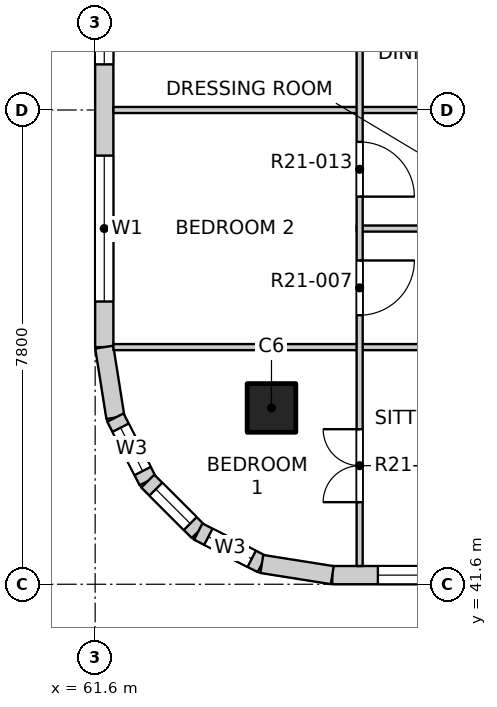
"""IFC4 building model, lengths in metres.
Left out: names, types, materials, properties, quantities, classifications, styles, units other than length and angle.
Written with IfcOpenShell. Run it as: python <this file> out.ifc"""

import sys

from ifc_helpers import new_model, si_unit, direction, frame, frame_2d, origin, origin_2d, place, context, subcontext, project, spatial, rectangle, extrude, element, fill, save


model = new_model("IFC4")
c1 = context("Model", 3, precision=1e-05, world=origin(), true_north=direction((0.0, 1.0)))
c2 = subcontext(c1, "Body", "Model", "MODEL_VIEW")
j1 = project(units=[si_unit("LENGTHUNIT", "METRE"), si_unit("PLANEANGLEUNIT", "RADIAN")], contexts=[c1])
p1 = place(None, origin())
s1 = spatial("IfcSite", under=j1, at=p1, CompositionType="ELEMENT")
p2 = place(p1, origin())
s2 = spatial("IfcBuilding", under=s1, at=p2, CompositionType="ELEMENT")
p3 = place(p2, frame((0.0, 0.0, 214.3)))
s3 = spatial("IfcBuildingStorey", under=s2, at=p3, CompositionType="ELEMENT", Elevation=214.3)
p4 = place(p3, frame((64.5, 44.5, -0.25), z_axis=(0.0, 0.0, 1.0), x_axis=(1.0, 0.0, 0.0)))
e1 = element("IfcColumn", 1, at=p4, inside=s3, PredefinedType="COLUMN", context=c2, shape_type="SweptSolid", body=[
    extrude(rectangle(XDim=0.8, YDim=0.8, at=origin_2d()), origin(), (0.0, 0.0, 1.0), 3.4),
])
p5 = place(p3, frame((65.5, 41.75, 0.0), z_axis=(0.0, 0.0, 1.0), x_axis=(1.0, 0.0, 0.0)))
e2 = element("IfcWall", 2, at=p5, inside=s3, PredefinedType="SOLIDWALL", context=c2, shape_type="SweptSolid", body=[
    extrude(rectangle(XDim=7.4, YDim=0.3, at=frame_2d((3.7, 0.0))), origin(), (0.0, 0.0, 1.0), 2.7),
])
p6 = place(p5, frame((0.75, 0.0, 0.9)))
e3 = element("IfcOpeningElement", 3, at=p6, cuts=e2, PredefinedType="OPENING", context=c2, shape_type="SweptSolid", body=[
    extrude(rectangle(XDim=2.4, YDim=1.8, at=frame_2d((1.2, 0.9))), frame((0.0, 0.16, 0.0), z_axis=(0.0, -1.0, 0.0), x_axis=(1.0, 0.0, 0.0)), (0.0, 0.0, 1.0), 0.32),
])
p7 = place(p5, frame((4.65, 0.0, 0.9)))
e4 = element("IfcOpeningElement", 4, at=p7, cuts=e2, PredefinedType="OPENING", context=c2, shape_type="SweptSolid", body=[
    extrude(rectangle(XDim=2.4, YDim=1.8, at=frame_2d((1.2, 0.9))), frame((0.0, 0.16, 0.0), z_axis=(0.0, -1.0, 0.0), x_axis=(1.0, 0.0, 0.0)), (0.0, 0.0, 1.0), 0.32),
])
p8 = place(p3, frame((61.75, 45.5, 0.0), z_axis=(0.0, 0.0, 1.0), x_axis=(0.0, 1.0, 0.0)))
e5 = element("IfcWall", 5, at=p8, inside=s3, PredefinedType="SOLIDWALL", context=c2, shape_type="SweptSolid", body=[
    extrude(rectangle(XDim=7.4, YDim=0.3, at=frame_2d((3.7, 0.0))), origin(), (0.0, 0.0, 1.0), 2.7),
])
p9 = place(p8, frame((0.75, 0.0, 0.9)))
e6 = element("IfcOpeningElement", 6, at=p9, cuts=e5, PredefinedType="OPENING", context=c2, shape_type="SweptSolid", body=[
    extrude(rectangle(XDim=2.4, YDim=1.8, at=frame_2d((1.2, 0.9))), frame((0.0, 0.16, 0.0), z_axis=(0.0, -1.0, 0.0), x_axis=(1.0, 0.0, 0.0)), (0.0, 0.0, 1.0), 0.32),
])
p10 = place(p8, frame((4.65, 0.0, 0.9)))
e7 = element("IfcOpeningElement", 7, at=p10, cuts=e5, PredefinedType="OPENING", context=c2, shape_type="SweptSolid", body=[
    extrude(rectangle(XDim=2.4, YDim=1.8, at=frame_2d((1.2, 0.9))), frame((0.0, 0.16, 0.0), z_axis=(0.0, -1.0, 0.0), x_axis=(1.0, 0.0, 0.0)), (0.0, 0.0, 1.0), 0.32),
])
p11 = place(p3, frame((61.75, 45.5, 0.0), z_axis=(0.0, 0.0, 1.0), x_axis=(0.156496880861, -0.987678452879, 0.0)))
e8 = element("IfcWall", 8, at=p11, inside=s3, PredefinedType="SOLIDWALL", context=c2, shape_type="SweptSolid", body=[
    extrude(rectangle(XDim=1.173, YDim=0.3, at=frame_2d((0.586, 0.0))), origin(), (0.0, 0.0, 1.0), 2.7),
])
p12 = place(p3, frame((61.934, 44.341, 0.0), z_axis=(0.0, 0.0, 1.0), x_axis=(0.454025524128, -0.890988677504, 0.0)))
e9 = element("IfcWall", 9, at=p12, inside=s3, PredefinedType="SOLIDWALL", context=c2, shape_type="SweptSolid", body=[
    extrude(rectangle(XDim=1.173, YDim=0.3, at=frame_2d((0.587, 0.0))), origin(), (0.0, 0.0, 1.0), 2.7),
])
p13 = place(p12, frame((0.187, 0.0, 0.9)))
e10 = element("IfcOpeningElement", 10, at=p13, cuts=e9, PredefinedType="OPENING", context=c2, shape_type="SweptSolid", body=[
    extrude(rectangle(XDim=0.8, YDim=1.2, at=frame_2d((0.4, 0.6))), frame((0.0, 0.16, 0.0), z_axis=(0.0, -1.0, 0.0), x_axis=(1.0, 0.0, 0.0)), (0.0, 0.0, 1.0), 0.32),
])
p14 = place(p3, frame((62.466, 43.296, 0.0), z_axis=(0.0, 0.0, 1.0), x_axis=(0.707106781187, -0.707106781187, 0.0)))
e11 = element("IfcWall", 11, at=p14, inside=s3, PredefinedType="SOLIDWALL", context=c2, shape_type="SweptSolid", body=[
    extrude(rectangle(XDim=1.173, YDim=0.3, at=frame_2d((0.586, 0.0))), origin(), (0.0, 0.0, 1.0), 2.7),
])
p15 = place(p14, frame((0.187, 0.0, 0.9)))
e12 = element("IfcOpeningElement", 12, at=p15, cuts=e11, PredefinedType="OPENING", context=c2, shape_type="SweptSolid", body=[
    extrude(rectangle(XDim=0.8, YDim=1.2, at=frame_2d((0.4, 0.6))), frame((0.0, 0.16, 0.0), z_axis=(0.0, -1.0, 0.0), x_axis=(1.0, 0.0, 0.0)), (0.0, 0.0, 1.0), 0.32),
])
p16 = place(p3, frame((63.296, 42.466, 0.0), z_axis=(0.0, 0.0, 1.0), x_axis=(0.890988677504, -0.454025524128, 0.0)))
e13 = element("IfcWall", 13, at=p16, inside=s3, PredefinedType="SOLIDWALL", context=c2, shape_type="SweptSolid", body=[
    extrude(rectangle(XDim=1.173, YDim=0.3, at=frame_2d((0.587, 0.0))), origin(), (0.0, 0.0, 1.0), 2.7),
])
p17 = place(p16, frame((0.187, 0.0, 0.9)))
e14 = element("IfcOpeningElement", 14, at=p17, cuts=e13, PredefinedType="OPENING", context=c2, shape_type="SweptSolid", body=[
    extrude(rectangle(XDim=0.8, YDim=1.2, at=frame_2d((0.4, 0.6))), frame((0.0, 0.16, 0.0), z_axis=(0.0, -1.0, 0.0), x_axis=(1.0, 0.0, 0.0)), (0.0, 0.0, 1.0), 0.32),
])
p18 = place(p3, frame((64.341, 41.934, 0.0), z_axis=(0.0, 0.0, 1.0), x_axis=(0.987678452879, -0.156496880861, 0.0)))
e15 = element("IfcWall", 15, at=p18, inside=s3, PredefinedType="SOLIDWALL", context=c2, shape_type="SweptSolid", body=[
    extrude(rectangle(XDim=1.173, YDim=0.3, at=frame_2d((0.586, 0.0))), origin(), (0.0, 0.0, 1.0), 2.7),
])
p19 = place(p3, frame((61.9, 45.5, 0.0), z_axis=(0.0, 0.0, 1.0), x_axis=(1.0, 0.0, 0.0)))
e16 = element("IfcWall", 16, at=p19, inside=s3, PredefinedType="PARTITIONING", context=c2, shape_type="SweptSolid", body=[
    extrude(rectangle(XDim=11.475, YDim=0.1, at=frame_2d((5.737, 0.0))), origin(), (0.0, 0.0, 1.0), 3.15),
])
p20 = place(p19, frame((7.965, 0.0, 0.0)))
e17 = element("IfcOpeningElement", 17, at=p20, cuts=e16, PredefinedType="OPENING", context=c2, shape_type="SweptSolid", body=[
    extrude(rectangle(XDim=0.9, YDim=2.1, at=frame_2d((0.45, 1.05))), frame((0.0, 0.06, 0.0), z_axis=(0.0, -1.0, 0.0), x_axis=(1.0, 0.0, 0.0)), (0.0, 0.0, 1.0), 0.12),
])
p21 = place(p3, frame((65.9, 47.45, 0.0), z_axis=(0.0, 0.0, 1.0), x_axis=(1.0, 0.0, 0.0)))
e18 = element("IfcWall", 18, at=p21, inside=s3, PredefinedType="PARTITIONING", context=c2, shape_type="SweptSolid", body=[
    extrude(rectangle(XDim=3.55, YDim=0.1, at=frame_2d((1.775, 0.0))), origin(), (0.0, 0.0, 1.0), 3.15),
])
p22 = place(p3, frame((61.9, 49.4, 0.0), z_axis=(0.0, 0.0, 1.0), x_axis=(1.0, 0.0, 0.0)))
e19 = element("IfcWall", 19, at=p22, inside=s3, PredefinedType="PARTITIONING", context=c2, shape_type="SweptSolid", body=[
    extrude(rectangle(XDim=7.55, YDim=0.1, at=frame_2d((3.775, 0.0))), origin(), (0.0, 0.0, 1.0), 3.15),
])
p23 = place(p3, frame((65.95, 41.9, 0.0), z_axis=(0.0, 0.0, 1.0), x_axis=(0.0, 1.0, 0.0)))
e20 = element("IfcWall", 20, at=p23, inside=s3, PredefinedType="PARTITIONING", context=c2, shape_type="SweptSolid", body=[
    extrude(rectangle(XDim=19.1, YDim=0.1, at=frame_2d((9.55, 0.0))), origin(), (0.0, 0.0, 1.0), 3.15),
])
p24 = place(p23, frame((1.05, 0.0, 0.0)))
e21 = element("IfcOpeningElement", 21, at=p24, cuts=e20, PredefinedType="OPENING", context=c2, shape_type="SweptSolid", body=[
    extrude(rectangle(XDim=1.2, YDim=2.1, at=frame_2d((0.6, 1.05))), frame((0.0, 0.06, 0.0), z_axis=(0.0, -1.0, 0.0), x_axis=(1.0, 0.0, 0.0)), (0.0, 0.0, 1.0), 0.12),
])
p25 = place(p23, frame((4.125, 0.0, 0.0)))
e22 = element("IfcOpeningElement", 22, at=p25, cuts=e20, PredefinedType="OPENING", context=c2, shape_type="SweptSolid", body=[
    extrude(rectangle(XDim=0.9, YDim=2.1, at=frame_2d((0.45, 1.05))), frame((0.0, 0.06, 0.0), z_axis=(0.0, -1.0, 0.0), x_axis=(1.0, 0.0, 0.0)), (0.0, 0.0, 1.0), 0.12),
])
p26 = place(p23, frame((6.075, 0.0, 0.0)))
e23 = element("IfcOpeningElement", 23, at=p26, cuts=e20, PredefinedType="OPENING", context=c2, shape_type="SweptSolid", body=[
    extrude(rectangle(XDim=0.9, YDim=2.1, at=frame_2d((0.45, 1.05))), frame((0.0, 0.06, 0.0), z_axis=(0.0, -1.0, 0.0), x_axis=(1.0, 0.0, 0.0)), (0.0, 0.0, 1.0), 0.12),
])
p27 = place(p23, frame((8.85, 0.0, 0.0)))
e24 = element("IfcOpeningElement", 24, at=p27, cuts=e20, PredefinedType="OPENING", context=c2, shape_type="SweptSolid", body=[
    extrude(rectangle(XDim=1.2, YDim=2.1, at=frame_2d((0.6, 1.05))), frame((0.0, 0.06, 0.0), z_axis=(0.0, -1.0, 0.0), x_axis=(1.0, 0.0, 0.0)), (0.0, 0.0, 1.0), 0.12),
])
p28 = place(p23, frame((12.75, 0.0, 0.0)))
e25 = element("IfcOpeningElement", 25, at=p28, cuts=e20, PredefinedType="OPENING", context=c2, shape_type="SweptSolid", body=[
    extrude(rectangle(XDim=1.2, YDim=2.1, at=frame_2d((0.6, 1.05))), frame((0.0, 0.06, 0.0), z_axis=(0.0, -1.0, 0.0), x_axis=(1.0, 0.0, 0.0)), (0.0, 0.0, 1.0), 0.12),
])
p29 = place(p23, frame((15.825, 0.0, 0.0)))
e26 = element("IfcOpeningElement", 26, at=p29, cuts=e20, PredefinedType="OPENING", context=c2, shape_type="SweptSolid", body=[
    extrude(rectangle(XDim=0.9, YDim=2.1, at=frame_2d((0.45, 1.05))), frame((0.0, 0.06, 0.0), z_axis=(0.0, -1.0, 0.0), x_axis=(1.0, 0.0, 0.0)), (0.0, 0.0, 1.0), 0.12),
])
p30 = place(p23, frame((17.775, 0.0, 0.0)))
e27 = element("IfcOpeningElement", 27, at=p30, cuts=e20, PredefinedType="OPENING", context=c2, shape_type="SweptSolid", body=[
    extrude(rectangle(XDim=0.9, YDim=2.1, at=frame_2d((0.45, 1.05))), frame((0.0, 0.06, 0.0), z_axis=(0.0, -1.0, 0.0), x_axis=(1.0, 0.0, 0.0)), (0.0, 0.0, 1.0), 0.12),
])
p31 = place(p6, origin())
e28 = element("IfcWindow", 28, at=p31, inside=s3, PartitioningType="DOUBLE_PANEL_VERTICAL", PredefinedType="WINDOW", context=c2, shape_type="SweptSolid", body=[
    extrude(rectangle(XDim=2.4, YDim=1.8, at=frame_2d((1.2, 0.9))), frame((0.0, 0.03, 0.0), z_axis=(0.0, -1.0, 0.0), x_axis=(1.0, 0.0, 0.0)), (0.0, 0.0, 1.0), 0.06),
])
fill(e3, e28)
p32 = place(p9, origin())
e29 = element("IfcWindow", 29, at=p32, inside=s3, PartitioningType="DOUBLE_PANEL_VERTICAL", PredefinedType="WINDOW", context=c2, shape_type="SweptSolid", body=[
    extrude(rectangle(XDim=2.4, YDim=1.8, at=frame_2d((1.2, 0.9))), frame((0.0, 0.03, 0.0), z_axis=(0.0, -1.0, 0.0), x_axis=(1.0, 0.0, 0.0)), (0.0, 0.0, 1.0), 0.06),
])
fill(e6, e29)
p33 = place(p10, origin())
e30 = element("IfcWindow", 30, at=p33, inside=s3, PartitioningType="DOUBLE_PANEL_VERTICAL", PredefinedType="WINDOW", context=c2, shape_type="SweptSolid", body=[
    extrude(rectangle(XDim=2.4, YDim=1.8, at=frame_2d((1.2, 0.9))), frame((0.0, 0.03, 0.0), z_axis=(0.0, -1.0, 0.0), x_axis=(1.0, 0.0, 0.0)), (0.0, 0.0, 1.0), 0.06),
])
fill(e7, e30)
p34 = place(p13, origin())
e31 = element("IfcWindow", 31, at=p34, inside=s3, PartitioningType="SINGLE_PANEL", PredefinedType="WINDOW", context=c2, shape_type="SweptSolid", body=[
    extrude(rectangle(XDim=0.8, YDim=1.2, at=frame_2d((0.4, 0.6))), frame((0.0, 0.03, 0.0), z_axis=(0.0, -1.0, 0.0), x_axis=(1.0, 0.0, 0.0)), (0.0, 0.0, 1.0), 0.06),
])
fill(e10, e31)
p35 = place(p15, origin())
e32 = element("IfcWindow", 32, at=p35, inside=s3, PartitioningType="SINGLE_PANEL", PredefinedType="WINDOW", context=c2, shape_type="SweptSolid", body=[
    extrude(rectangle(XDim=0.8, YDim=1.2, at=frame_2d((0.4, 0.6))), frame((0.0, 0.03, 0.0), z_axis=(0.0, -1.0, 0.0), x_axis=(1.0, 0.0, 0.0)), (0.0, 0.0, 1.0), 0.06),
])
fill(e12, e32)
p36 = place(p17, origin())
e33 = element("IfcWindow", 33, at=p36, inside=s3, PartitioningType="SINGLE_PANEL", PredefinedType="WINDOW", context=c2, shape_type="SweptSolid", body=[
    extrude(rectangle(XDim=0.8, YDim=1.2, at=frame_2d((0.4, 0.6))), frame((0.0, 0.03, 0.0), z_axis=(0.0, -1.0, 0.0), x_axis=(1.0, 0.0, 0.0)), (0.0, 0.0, 1.0), 0.06),
])
fill(e14, e33)
p37 = place(p24, origin())
e34 = element("IfcDoor", 34, at=p37, inside=s3, OperationType="DOUBLE_DOOR_SINGLE_SWING", PredefinedType="DOOR", context=c2, shape_type="SweptSolid", body=[
    extrude(rectangle(XDim=1.2, YDim=2.1, at=frame_2d((0.6, 1.05))), frame((0.0, 0.025, 0.0), z_axis=(0.0, -1.0, 0.0), x_axis=(1.0, 0.0, 0.0)), (0.0, 0.0, 1.0), 0.05),
])
fill(e21, e34)
p38 = place(p25, origin())
e35 = element("IfcDoor", 35, at=p38, inside=s3, OperationType="SINGLE_SWING_LEFT", PredefinedType="DOOR", context=c2, shape_type="SweptSolid", body=[
    extrude(rectangle(XDim=0.9, YDim=2.1, at=frame_2d((0.45, 1.05))), frame((0.0, 0.025, 0.0), z_axis=(0.0, -1.0, 0.0), x_axis=(1.0, 0.0, 0.0)), (0.0, 0.0, 1.0), 0.05),
])
fill(e22, e35)
p39 = place(p26, origin())
e36 = element("IfcDoor", 36, at=p39, inside=s3, OperationType="SINGLE_SWING_RIGHT", PredefinedType="DOOR", context=c2, shape_type="SweptSolid", body=[
    extrude(rectangle(XDim=0.9, YDim=2.1, at=frame_2d((0.45, 1.05))), frame((0.0, 0.025, 0.0), z_axis=(0.0, -1.0, 0.0), x_axis=(1.0, 0.0, 0.0)), (0.0, 0.0, 1.0), 0.05),
])
fill(e23, e36)
save(model, sys.argv[1])
